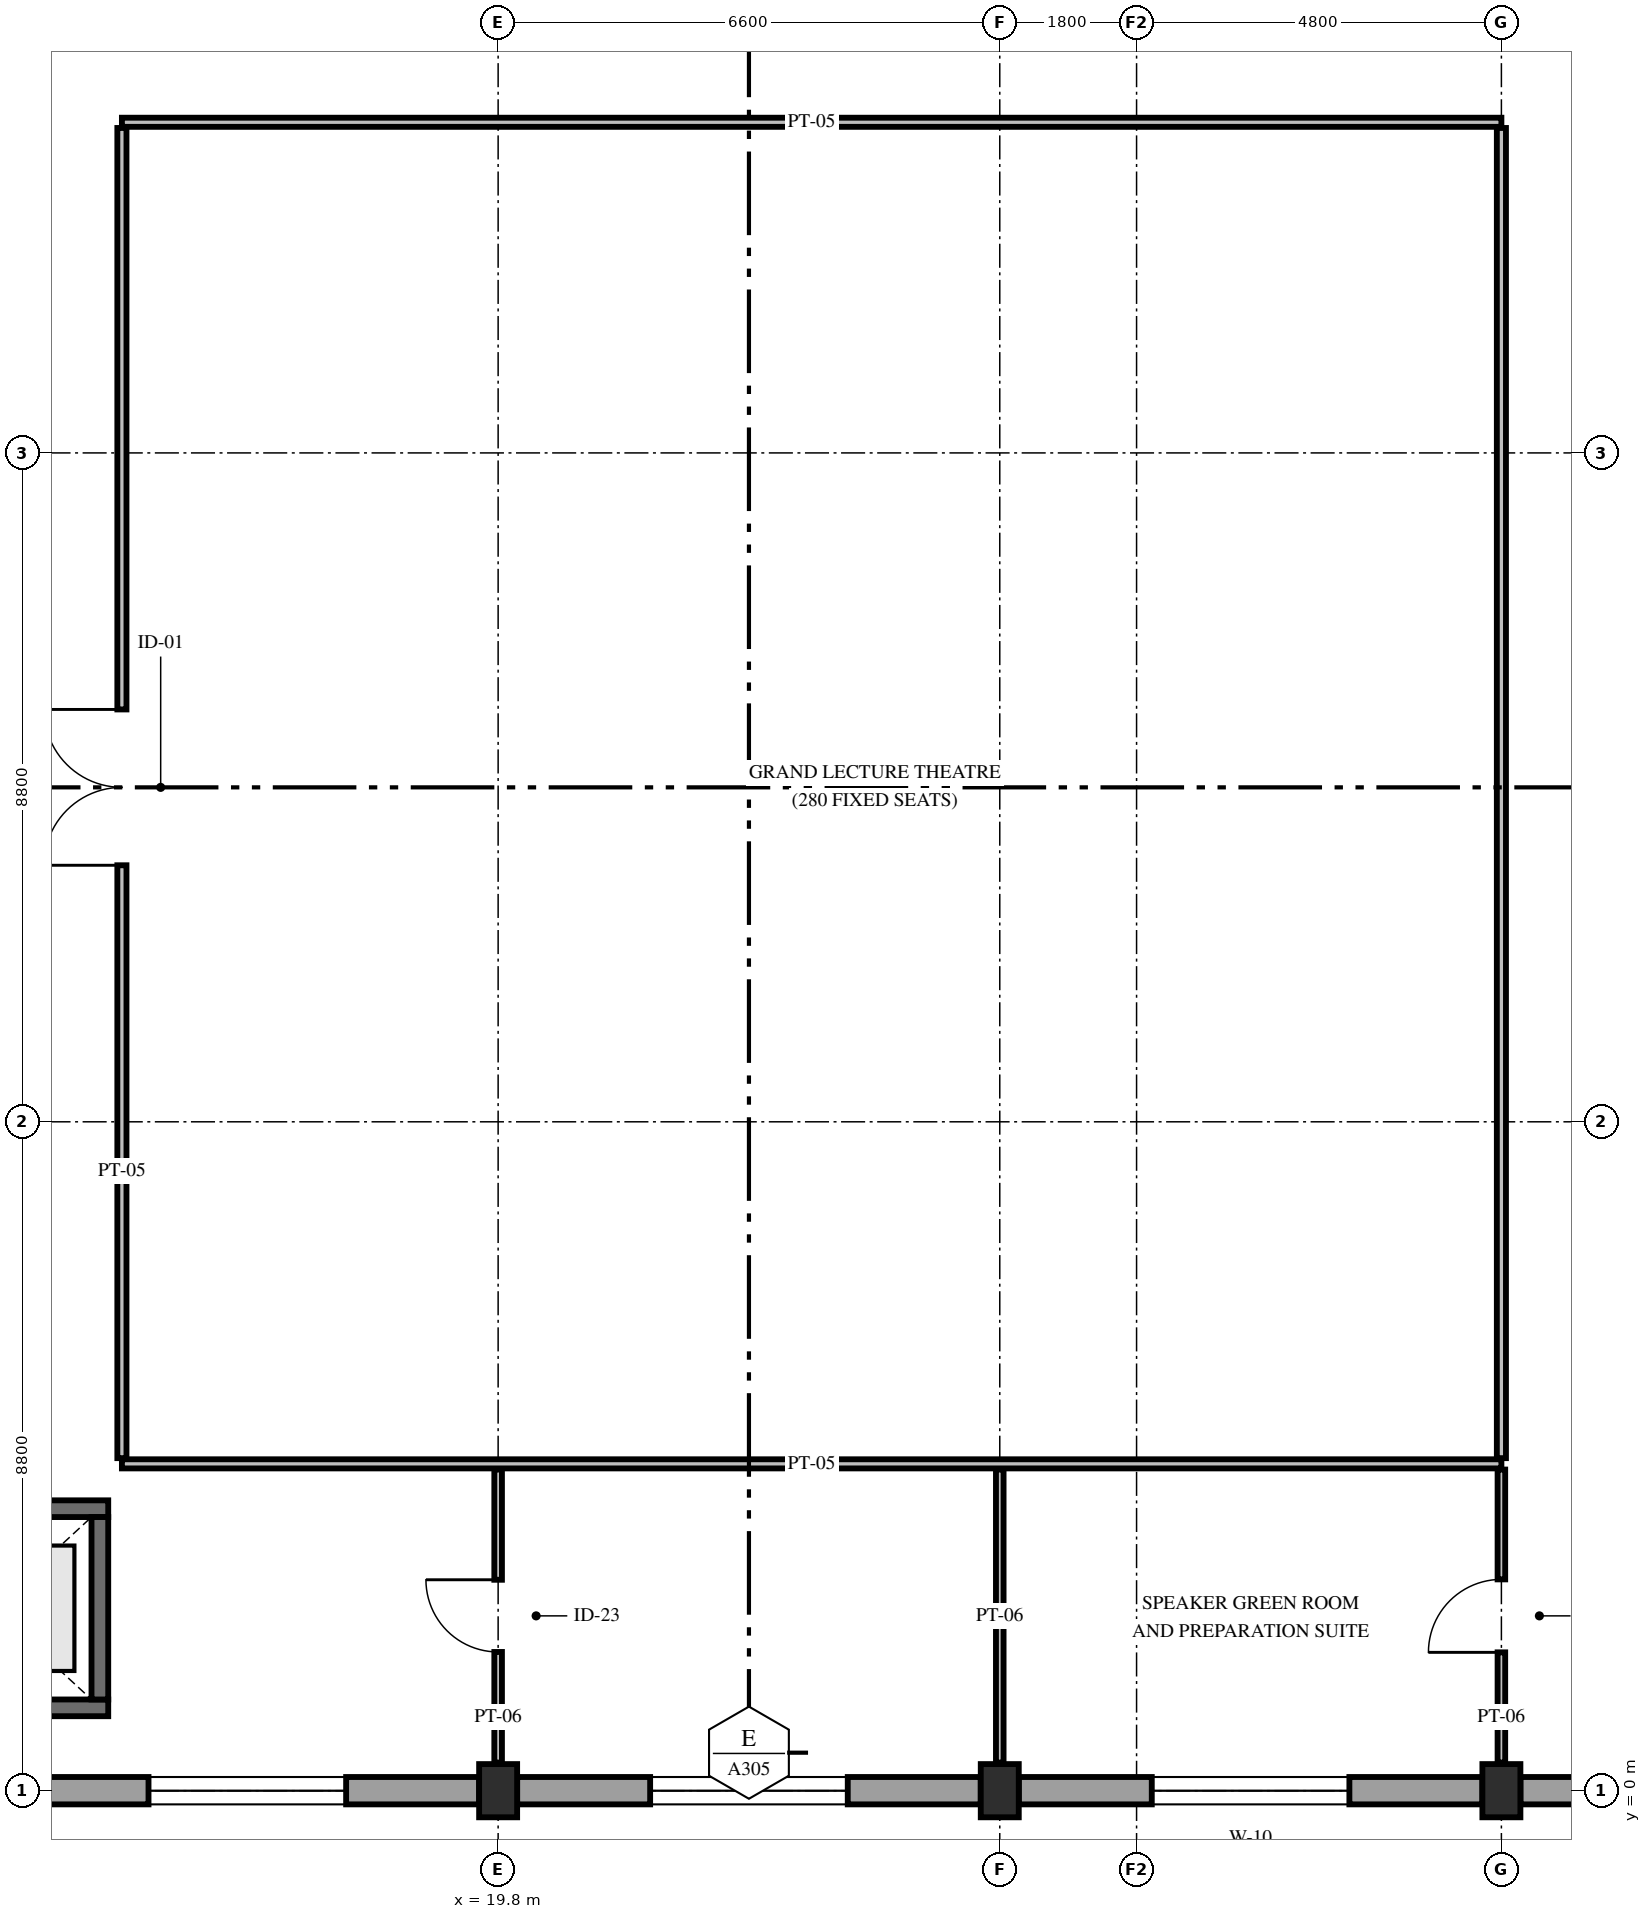
"""IFC4 building model, lengths in metres.
Left out: names, types, materials, properties, quantities, classifications, styles, units other than length and angle.
Written with IfcOpenShell. Run it as: python <this file> out.ifc"""

import sys

from ifc_helpers import new_model, si_unit, direction, frame, frame_2d, origin, origin_2d, place, context, subcontext, project, spatial, rectangle, extrude, element, fill, save


model = new_model("IFC4")
c1 = context("Model", 3, precision=1e-05, world=origin(), true_north=direction((0.0, 1.0)))
c2 = subcontext(c1, "Body", "Model", "MODEL_VIEW")
j1 = project(units=[si_unit("LENGTHUNIT", "METRE"), si_unit("PLANEANGLEUNIT", "RADIAN")], contexts=[c1])
p1 = place(None, origin())
s1 = spatial("IfcSite", under=j1, at=p1, CompositionType="ELEMENT")
p2 = place(p1, origin())
s2 = spatial("IfcBuilding", under=s1, at=p2, CompositionType="ELEMENT")
p3 = place(p2, origin())
s3 = spatial("IfcBuildingStorey", under=s2, at=p3, CompositionType="ELEMENT", Elevation=0.0)
for number, where, z_axis, x_axis in (
    (1, (19.8, 0.0, 0.0), (0.0, 0.0, 1.0), (1.0, 0.0, 0.0)),
    (2, (26.4, 0.0, 0.0), (0.0, 0.0, 1.0), (1.0, 0.0, 0.0)),
    (3, (33.0, 0.0, 0.0), (0.0, 0.0, 1.0), (1.0, 0.0, 0.0)),
):
    element("IfcColumn", number, at=place(p3, frame(where, z_axis=z_axis, x_axis=x_axis)), inside=s3, PredefinedType="PILASTER", context=c2, shape_type="SweptSolid", body=[
        extrude(rectangle(XDim=0.5, YDim=0.7, at=origin_2d()), origin(), (0.0, 0.0, 1.0), 5.4),
    ])
p4 = place(p3, frame((39.35, 0.0, 0.0), z_axis=(0.0, 0.0, 1.0), x_axis=(-1.0, 0.0, 0.0)))
e4 = element("IfcWall", 4, at=p4, inside=s3, PredefinedType="STANDARD", context=c2, shape_type="SweptSolid", body=[
    extrude(rectangle(XDim=6.1, YDim=0.36, at=frame_2d((3.05, 0.0))), origin(), (0.0, 0.0, 1.0), 4.55),
])
p5 = place(p4, frame((1.75, 0.0, 0.85)))
e5 = element("IfcOpeningElement", 5, at=p5, cuts=e4, PredefinedType="OPENING", context=c2, shape_type="SweptSolid", body=[
    extrude(rectangle(XDim=2.6, YDim=1.5, at=frame_2d((1.3, 0.75))), frame((0.0, 0.195, 0.0), z_axis=(0.0, -1.0, 0.0), x_axis=(1.0, 0.0, 0.0)), (0.0, 0.0, 1.0), 0.39),
])
p6 = place(p3, frame((32.75, 0.0, 0.0), z_axis=(0.0, 0.0, 1.0), x_axis=(-1.0, 0.0, 0.0)))
e6 = element("IfcWall", 6, at=p6, inside=s3, PredefinedType="STANDARD", context=c2, shape_type="SweptSolid", body=[
    extrude(rectangle(XDim=6.1, YDim=0.36, at=frame_2d((3.05, 0.0))), origin(), (0.0, 0.0, 1.0), 4.55),
])
p7 = place(p6, frame((1.75, 0.0, 0.85)))
e7 = element("IfcOpeningElement", 7, at=p7, cuts=e6, PredefinedType="OPENING", context=c2, shape_type="SweptSolid", body=[
    extrude(rectangle(XDim=2.6, YDim=1.5, at=frame_2d((1.3, 0.75))), frame((0.0, 0.195, 0.0), z_axis=(0.0, -1.0, 0.0), x_axis=(1.0, 0.0, 0.0)), (0.0, 0.0, 1.0), 0.39),
])
p8 = place(p3, frame((26.15, 0.0, 0.0), z_axis=(0.0, 0.0, 1.0), x_axis=(-1.0, 0.0, 0.0)))
e8 = element("IfcWall", 8, at=p8, inside=s3, PredefinedType="STANDARD", context=c2, shape_type="SweptSolid", body=[
    extrude(rectangle(XDim=6.1, YDim=0.36, at=frame_2d((3.05, 0.0))), origin(), (0.0, 0.0, 1.0), 4.55),
])
p9 = place(p8, frame((1.75, 0.0, 0.85)))
e9 = element("IfcOpeningElement", 9, at=p9, cuts=e8, PredefinedType="OPENING", context=c2, shape_type="SweptSolid", body=[
    extrude(rectangle(XDim=2.6, YDim=1.5, at=frame_2d((1.3, 0.75))), frame((0.0, 0.195, 0.0), z_axis=(0.0, -1.0, 0.0), x_axis=(1.0, 0.0, 0.0)), (0.0, 0.0, 1.0), 0.39),
])
p10 = place(p3, frame((19.55, 0.0, 0.0), z_axis=(0.0, 0.0, 1.0), x_axis=(-1.0, 0.0, 0.0)))
e10 = element("IfcWall", 10, at=p10, inside=s3, PredefinedType="STANDARD", context=c2, shape_type="SweptSolid", body=[
    extrude(rectangle(XDim=6.1, YDim=0.36, at=frame_2d((3.05, 0.0))), origin(), (0.0, 0.0, 1.0), 4.55),
])
p11 = place(p10, frame((1.75, 0.0, 0.85)))
e11 = element("IfcOpeningElement", 11, at=p11, cuts=e10, PredefinedType="OPENING", context=c2, shape_type="SweptSolid", body=[
    extrude(rectangle(XDim=2.6, YDim=1.5, at=frame_2d((1.3, 0.75))), frame((0.0, 0.195, 0.0), z_axis=(0.0, -1.0, 0.0), x_axis=(1.0, 0.0, 0.0)), (0.0, 0.0, 1.0), 0.39),
])
p12 = place(p3, frame((11.63, 1.09, 0.0), z_axis=(0.0, 0.0, 1.0), x_axis=(1.0, 0.0, 0.0)))
e12 = element("IfcWall", 12, at=p12, inside=s3, PredefinedType="SHEAR", context=c2, shape_type="SweptSolid", body=[
    extrude(rectangle(XDim=3.04, YDim=0.22, at=frame_2d((1.52, 0.0))), origin(), (0.0, 0.0, 1.0), 5.1),
])
p13 = place(p3, frame((11.63, 3.71, 0.0), z_axis=(0.0, 0.0, 1.0), x_axis=(1.0, 0.0, 0.0)))
e13 = element("IfcWall", 13, at=p13, inside=s3, PredefinedType="SHEAR", context=c2, shape_type="SweptSolid", body=[
    extrude(rectangle(XDim=3.04, YDim=0.22, at=frame_2d((1.52, 0.0))), origin(), (0.0, 0.0, 1.0), 5.1),
])
p14 = place(p13, frame((0.97, 0.0, 0.0)))
e14 = element("IfcOpeningElement", 14, at=p14, cuts=e13, PredefinedType="OPENING", context=c2, shape_type="SweptSolid", body=[
    extrude(rectangle(XDim=1.1, YDim=2.2, at=frame_2d((0.55, 1.1))), frame((0.0, 0.125, 0.0), z_axis=(0.0, -1.0, 0.0), x_axis=(1.0, 0.0, 0.0)), (0.0, 0.0, 1.0), 0.25),
])
p15 = place(p3, frame((14.56, 1.2, 0.0), z_axis=(0.0, 0.0, 1.0), x_axis=(0.0, 1.0, 0.0)))
e15 = element("IfcWall", 15, at=p15, inside=s3, PredefinedType="SHEAR", context=c2, shape_type="SweptSolid", body=[
    extrude(rectangle(XDim=2.4, YDim=0.22, at=frame_2d((1.2, 0.0))), origin(), (0.0, 0.0, 1.0), 5.1),
])
for number, where, z_axis, x_axis in (
    (16, (14.85, 4.3, 0.0), (0.0, 0.0, 1.0), (1.0, 0.0, 0.0)),
    (17, (14.85, 21.95, 0.0), (0.0, 0.0, 1.0), (1.0, 0.0, 0.0)),
):
    element("IfcWall", number, at=place(p3, frame(where, z_axis=z_axis, x_axis=x_axis)), inside=s3, PredefinedType="PARTITIONING", context=c2, shape_type="SweptSolid", body=[
        extrude(rectangle(XDim=18.15, YDim=0.12, at=frame_2d((9.075, 0.0))), origin(), (0.0, 0.0, 1.0), 5.08),
    ])
p16 = place(p3, frame((14.85, 4.375, 0.0), z_axis=(0.0, 0.0, 1.0), x_axis=(0.0, 1.0, 0.0)))
e18 = element("IfcWall", 18, at=p16, inside=s3, PredefinedType="PARTITIONING", context=c2, shape_type="SweptSolid", body=[
    extrude(rectangle(XDim=17.5, YDim=0.12, at=frame_2d((8.75, 0.0))), origin(), (0.0, 0.0, 1.0), 5.08),
])
p17 = place(p16, frame((7.8, 0.0, 0.0)))
e19 = element("IfcOpeningElement", 19, at=p17, cuts=e18, PredefinedType="OPENING", context=c2, shape_type="SweptSolid", body=[
    extrude(rectangle(XDim=2.05, YDim=2.4, at=frame_2d((1.025, 1.2))), frame((0.0, 0.075, 0.0), z_axis=(0.0, -1.0, 0.0), x_axis=(1.0, 0.0, 0.0)), (0.0, 0.0, 1.0), 0.15),
])
p18 = place(p3, frame((33.0, 4.375, 0.0), z_axis=(0.0, 0.0, 1.0), x_axis=(0.0, 1.0, 0.0)))
e20 = element("IfcWall", 20, at=p18, inside=s3, PredefinedType="PARTITIONING", context=c2, shape_type="SweptSolid", body=[
    extrude(rectangle(XDim=17.5, YDim=0.12, at=frame_2d((8.75, 0.0))), origin(), (0.0, 0.0, 1.0), 5.08),
])
p19 = place(p3, frame((19.8, 0.37, 0.0), z_axis=(0.0, 0.0, 1.0), x_axis=(0.0, 1.0, 0.0)))
e21 = element("IfcWall", 21, at=p19, inside=s3, PredefinedType="PARTITIONING", context=c2, shape_type="SweptSolid", body=[
    extrude(rectangle(XDim=3.855, YDim=0.1, at=frame_2d((1.927, 0.0))), origin(), (0.0, 0.0, 1.0), 5.08),
])
p20 = place(p19, frame((1.455, 0.0, 0.0)))
e22 = element("IfcOpeningElement", 22, at=p20, cuts=e21, PredefinedType="OPENING", context=c2, shape_type="SweptSolid", body=[
    extrude(rectangle(XDim=0.95, YDim=2.15, at=frame_2d((0.475, 1.075))), frame((0.0, 0.065, 0.0), z_axis=(0.0, -1.0, 0.0), x_axis=(1.0, 0.0, 0.0)), (0.0, 0.0, 1.0), 0.13),
])
p21 = place(p3, frame((26.4, 0.37, 0.0), z_axis=(0.0, 0.0, 1.0), x_axis=(0.0, 1.0, 0.0)))
e23 = element("IfcWall", 23, at=p21, inside=s3, PredefinedType="PARTITIONING", context=c2, shape_type="SweptSolid", body=[
    extrude(rectangle(XDim=3.855, YDim=0.1, at=frame_2d((1.927, 0.0))), origin(), (0.0, 0.0, 1.0), 5.08),
])
p22 = place(p3, frame((33.0, 0.37, 0.0), z_axis=(0.0, 0.0, 1.0), x_axis=(0.0, 1.0, 0.0)))
e24 = element("IfcWall", 24, at=p22, inside=s3, PredefinedType="PARTITIONING", context=c2, shape_type="SweptSolid", body=[
    extrude(rectangle(XDim=3.855, YDim=0.1, at=frame_2d((1.927, 0.0))), origin(), (0.0, 0.0, 1.0), 5.08),
])
p23 = place(p22, frame((1.45, 0.0, 0.0)))
e25 = element("IfcOpeningElement", 25, at=p23, cuts=e24, PredefinedType="OPENING", context=c2, shape_type="SweptSolid", body=[
    extrude(rectangle(XDim=0.96, YDim=2.15, at=frame_2d((0.48, 1.075))), frame((0.0, 0.065, 0.0), z_axis=(0.0, -1.0, 0.0), x_axis=(1.0, 0.0, 0.0)), (0.0, 0.0, 1.0), 0.13),
])
p24 = place(p7, origin())
e26 = element("IfcWindow", 26, at=p24, inside=s3, PartitioningType="DOUBLE_PANEL_VERTICAL", PredefinedType="WINDOW", context=c2, shape_type="SweptSolid", body=[
    extrude(rectangle(XDim=2.6, YDim=1.5, at=frame_2d((1.3, 0.75))), frame((0.0, 0.03, 0.0), z_axis=(0.0, -1.0, 0.0), x_axis=(1.0, 0.0, 0.0)), (0.0, 0.0, 1.0), 0.06),
])
fill(e7, e26)
p25 = place(p9, origin())
e27 = element("IfcWindow", 27, at=p25, inside=s3, PartitioningType="DOUBLE_PANEL_VERTICAL", PredefinedType="WINDOW", context=c2, shape_type="SweptSolid", body=[
    extrude(rectangle(XDim=2.6, YDim=1.5, at=frame_2d((1.3, 0.75))), frame((0.0, 0.03, 0.0), z_axis=(0.0, -1.0, 0.0), x_axis=(1.0, 0.0, 0.0)), (0.0, 0.0, 1.0), 0.06),
])
fill(e9, e27)
p26 = place(p11, origin())
e28 = element("IfcWindow", 28, at=p26, inside=s3, PartitioningType="DOUBLE_PANEL_VERTICAL", PredefinedType="WINDOW", context=c2, shape_type="SweptSolid", body=[
    extrude(rectangle(XDim=2.6, YDim=1.5, at=frame_2d((1.3, 0.75))), frame((0.0, 0.03, 0.0), z_axis=(0.0, -1.0, 0.0), x_axis=(1.0, 0.0, 0.0)), (0.0, 0.0, 1.0), 0.06),
])
fill(e11, e28)
p27 = place(p17, origin())
e29 = element("IfcDoor", 29, at=p27, inside=s3, OperationType="DOUBLE_DOOR_SINGLE_SWING", PredefinedType="DOOR", context=c2, shape_type="SweptSolid", body=[
    extrude(rectangle(XDim=2.05, YDim=2.4, at=frame_2d((1.025, 1.2))), frame((0.0, 0.025, 0.0), z_axis=(0.0, -1.0, 0.0), x_axis=(1.0, 0.0, 0.0)), (0.0, 0.0, 1.0), 0.05),
])
fill(e19, e29)
p28 = place(p20, origin())
e30 = element("IfcDoor", 30, at=p28, inside=s3, OperationType="SINGLE_SWING_RIGHT", PredefinedType="DOOR", context=c2, shape_type="SweptSolid", body=[
    extrude(rectangle(XDim=0.95, YDim=2.15, at=frame_2d((0.475, 1.075))), frame((0.0, 0.025, 0.0), z_axis=(0.0, -1.0, 0.0), x_axis=(1.0, 0.0, 0.0)), (0.0, 0.0, 1.0), 0.05),
])
fill(e22, e30)
p29 = place(p23, origin())
e31 = element("IfcDoor", 31, at=p29, inside=s3, OperationType="SINGLE_SWING_LEFT", PredefinedType="DOOR", context=c2, shape_type="SweptSolid", body=[
    extrude(rectangle(XDim=0.96, YDim=2.15, at=frame_2d((0.48, 1.075))), frame((0.0, 0.025, 0.0), z_axis=(0.0, -1.0, 0.0), x_axis=(1.0, 0.0, 0.0)), (0.0, 0.0, 1.0), 0.05),
])
fill(e25, e31)
save(model, sys.argv[1])
